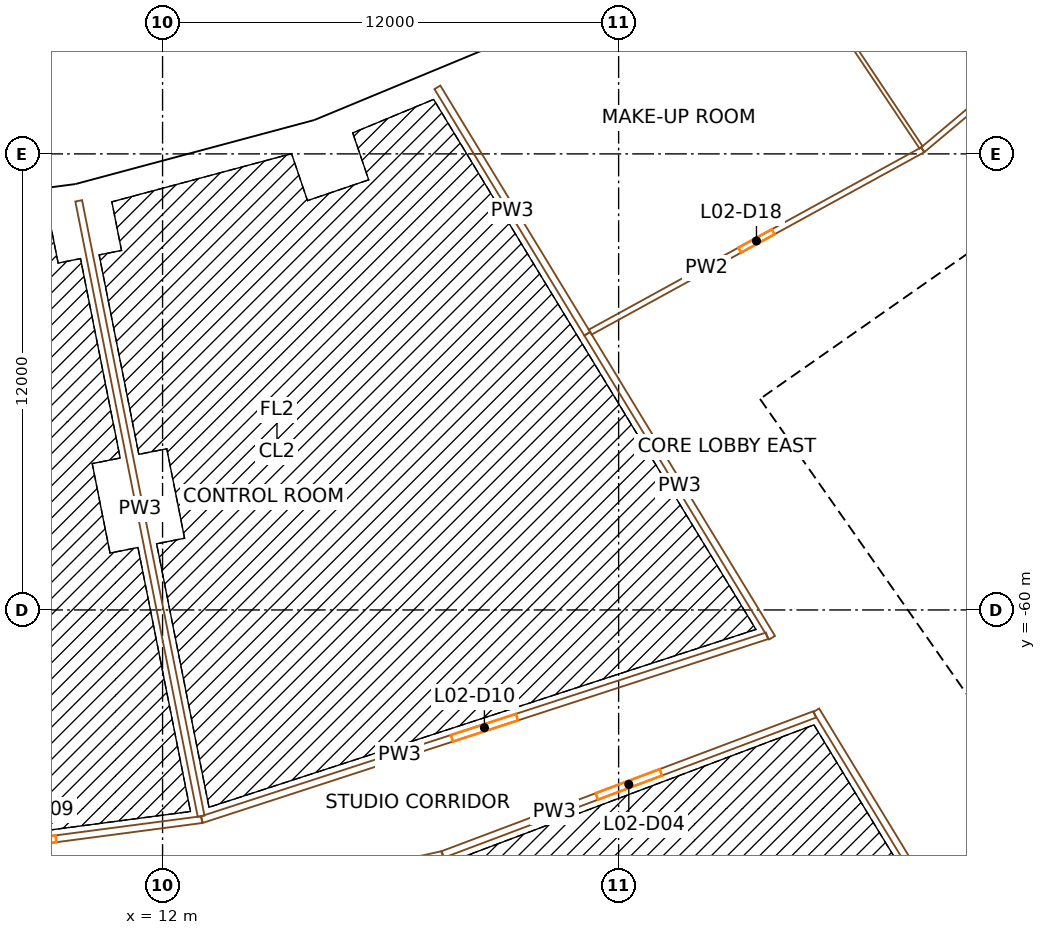
"""IFC4 building model, lengths in metres.
Left out: names, types, materials, properties, quantities, classifications, styles, units other than length and angle.
Written with IfcOpenShell. Run it as: python <this file> out.ifc"""

import sys

from ifc_helpers import new_model, si_unit, direction, frame, frame_2d, origin, origin_2d, place, context, subcontext, project, spatial, rectangle, extrude, element, fill, save


model = new_model("IFC4")
c1 = context("Model", 3, precision=1e-05, world=origin(), true_north=direction((0.0, 1.0)))
c2 = subcontext(c1, "Body", "Model", "MODEL_VIEW")
j1 = project(units=[si_unit("LENGTHUNIT", "METRE"), si_unit("PLANEANGLEUNIT", "RADIAN")], contexts=[c1])
p1 = place(None, origin())
s1 = spatial("IfcSite", under=j1, at=p1, CompositionType="ELEMENT")
p2 = place(p1, origin())
s2 = spatial("IfcBuilding", under=s1, at=p2, CompositionType="ELEMENT")
p3 = place(p2, frame((0.0, 0.0, 18.0)))
s3 = spatial("IfcBuildingStorey", under=s2, at=p3, CompositionType="ELEMENT", Elevation=18.0)
p4 = place(p3, frame((9.901, -49.775, 0.0), z_axis=(0.0, 0.0, 1.0), x_axis=(0.980785280403, 0.195090322016, 0.0)))
e1 = element("IfcColumn", 1, at=p4, inside=s3, PredefinedType="COLUMN", context=c2, shape_type="SweptSolid", body=[
    extrude(rectangle(XDim=1.1, YDim=1.3, at=origin_2d()), origin(), (0.0, 0.0, 1.0), 9.0),
])
p5 = place(p3, frame((11.364, -57.131, 0.0), z_axis=(0.0, 0.0, 1.0), x_axis=(0.980785280403, 0.195090322016, 0.0)))
e2 = element("IfcColumn", 2, at=p5, inside=s3, PredefinedType="COLUMN", context=c2, shape_type="SweptSolid", body=[
    extrude(rectangle(XDim=1.4, YDim=1.8, at=origin_2d()), origin(), (0.0, 0.0, 1.0), 9.0),
])
p6 = place(p3, frame((16.313, -48.057, 0.0), z_axis=(0.0, 0.0, 1.0), x_axis=(0.946930129495, 0.321439465303, 0.0)))
e3 = element("IfcColumn", 3, at=p6, inside=s3, PredefinedType="COLUMN", context=c2, shape_type="SweptSolid", body=[
    extrude(rectangle(XDim=1.1, YDim=1.3, at=origin_2d()), origin(), (0.0, 0.0, 1.0), 9.0),
])
p7 = place(p3, frame((18.724, -55.159, 0.0), z_axis=(0.0, 0.0, 1.0), x_axis=(0.946930129495, 0.321439465303, 0.0)))
e4 = element("IfcColumn", 4, at=p7, inside=s3, PredefinedType="COLUMN", context=c2, shape_type="SweptSolid", body=[
    extrude(rectangle(XDim=1.4, YDim=1.8, at=origin_2d()), origin(), (0.0, 0.0, 1.0), 9.0),
])
p8 = place(p3, frame((22.446, -45.516, 0.0), z_axis=(0.0, 0.0, 1.0), x_axis=(0.896872741533, 0.442288690219, 0.0)))
e5 = element("IfcColumn", 5, at=p8, inside=s3, PredefinedType="COLUMN", context=c2, shape_type="SweptSolid", body=[
    extrude(rectangle(XDim=1.1, YDim=1.3, at=origin_2d()), origin(), (0.0, 0.0, 1.0), 9.0),
])
for number, where, z_axis, x_axis in (
    (6, (25.763, -52.243, 0.0), (0.0, 0.0, 1.0), (0.897, 0.442, 0.0)),
    (7, (32.362, -48.433, 0.0), (0.0, 0.0, 1.0), (0.831, 0.556, 0.0)),
):
    element("IfcColumn", number, at=place(p3, frame(where, z_axis=z_axis, x_axis=x_axis)), inside=s3, PredefinedType="COLUMN", context=c2, shape_type="SweptSolid", body=[
        extrude(rectangle(XDim=1.4, YDim=1.8, at=origin_2d()), origin(), (0.0, 0.0, 1.0), 9.0),
    ])
p9 = place(p3, frame((36.717, -66.337, 0.0), z_axis=(0.0, 0.0, 1.0), x_axis=(-0.573577477574, 0.819151315216, 0.0)))
e8 = element("IfcWall", 8, at=p9, inside=s3, PredefinedType="SHEAR", context=c2, shape_type="SweptSolid", body=[
    extrude(rectangle(XDim=14.8, YDim=0.9, at=frame_2d((7.4, 0.0))), origin(), (0.0, 0.0, 1.0), 8.6),
])
p10 = place(p9, frame((6.2, 0.0, 0.0)))
e9 = element("IfcOpeningElement", 9, at=p10, cuts=e8, PredefinedType="OPENING", context=c2, shape_type="SweptSolid", body=[
    extrude(rectangle(XDim=2.4, YDim=2.1, at=frame_2d((1.2, 1.05))), frame((0.0, 0.46, 0.0), z_axis=(0.0, -1.0, 0.0), x_axis=(1.0, 0.0, 0.0)), (0.0, 0.0, 1.0), 0.92),
])
p11 = place(p3, frame((28.854, -54.324, 0.0), z_axis=(0.0, 0.0, 1.0), x_axis=(0.819145767589, 0.573585400304, 0.0)))
e10 = element("IfcWall", 10, at=p11, inside=s3, PredefinedType="SHEAR", context=c2, shape_type="SweptSolid", body=[
    extrude(rectangle(XDim=15.045, YDim=0.9, at=frame_2d((7.523, 0.0))), origin(), (0.0, 0.0, 1.0), 8.6),
])
p12 = place(p11, frame((0.6, 0.0, 0.0)))
e11 = element("IfcOpeningElement", 11, at=p12, cuts=e10, PredefinedType="OPENING", context=c2, shape_type="SweptSolid", body=[
    extrude(rectangle(XDim=1.0, YDim=2.1, at=frame_2d((0.5, 1.05))), frame((0.0, 0.46, 0.0), z_axis=(0.0, -1.0, 0.0), x_axis=(1.0, 0.0, 0.0)), (0.0, 0.0, 1.0), 0.92),
])
p13 = place(p11, frame((3.275, 0.0, 0.0)))
e12 = element("IfcOpeningElement", 12, at=p13, cuts=e10, PredefinedType="OPENING", context=c2, shape_type="SweptSolid", body=[
    extrude(rectangle(XDim=1.0, YDim=2.1, at=frame_2d((0.5, 1.05))), frame((0.0, 0.46, 0.0), z_axis=(0.0, -1.0, 0.0), x_axis=(1.0, 0.0, 0.0)), (0.0, 0.0, 1.0), 0.92),
])
p14 = place(p11, frame((6.225, 0.0, 0.0)))
e13 = element("IfcOpeningElement", 13, at=p14, cuts=e10, PredefinedType="OPENING", context=c2, shape_type="SweptSolid", body=[
    extrude(rectangle(XDim=0.9, YDim=2.1, at=frame_2d((0.45, 1.05))), frame((0.0, 0.46, 0.0), z_axis=(0.0, -1.0, 0.0), x_axis=(1.0, 0.0, 0.0)), (0.0, 0.0, 1.0), 0.92),
])
p15 = place(p11, frame((13.495, 0.0, 0.0)))
e14 = element("IfcOpeningElement", 14, at=p15, cuts=e10, PredefinedType="OPENING", context=c2, shape_type="SweptSolid", body=[
    extrude(rectangle(XDim=1.1, YDim=2.1, at=frame_2d((0.55, 1.05))), frame((0.0, 0.46, 0.0), z_axis=(0.0, -1.0, 0.0), x_axis=(1.0, 0.0, 0.0)), (0.0, 0.0, 1.0), 0.92),
])
p16 = place(p3, frame((31.895, -58.666, 0.0), z_axis=(0.0, 0.0, 1.0), x_axis=(0.819166993208, 0.573555086491, 0.0)))
e15 = element("IfcWall", 15, at=p16, inside=s3, PredefinedType="SOLIDWALL", context=c2, shape_type="SweptSolid", body=[
    extrude(rectangle(XDim=7.95, YDim=0.3, at=frame_2d((3.975, 0.0))), origin(), (0.0, 0.0, 1.0), 8.6),
])
p17 = place(p16, frame((0.675, 0.0, 0.0)))
e16 = element("IfcOpeningElement", 16, at=p17, cuts=e15, PredefinedType="OPENING", context=c2, shape_type="SweptSolid", body=[
    extrude(rectangle(XDim=1.1, YDim=2.1, at=frame_2d((0.55, 1.05))), frame((0.0, 0.16, 0.0), z_axis=(0.0, -1.0, 0.0), x_axis=(1.0, 0.0, 0.0)), (0.0, 0.0, 1.0), 0.32),
])
p18 = place(p16, frame((3.425, 0.0, 0.0)))
e17 = element("IfcOpeningElement", 17, at=p18, cuts=e15, PredefinedType="OPENING", context=c2, shape_type="SweptSolid", body=[
    extrude(rectangle(XDim=1.1, YDim=2.1, at=frame_2d((0.55, 1.05))), frame((0.0, 0.16, 0.0), z_axis=(0.0, -1.0, 0.0), x_axis=(1.0, 0.0, 0.0)), (0.0, 0.0, 1.0), 0.32),
])
p19 = place(p16, frame((6.175, 0.0, 0.0)))
e18 = element("IfcOpeningElement", 18, at=p19, cuts=e15, PredefinedType="OPENING", context=c2, shape_type="SweptSolid", body=[
    extrude(rectangle(XDim=1.1, YDim=2.1, at=frame_2d((0.55, 1.05))), frame((0.0, 0.16, 0.0), z_axis=(0.0, -1.0, 0.0), x_axis=(1.0, 0.0, 0.0)), (0.0, 0.0, 1.0), 0.32),
])
p20 = place(p3, frame((30.461, -56.618, 0.0), z_axis=(0.0, 0.0, 1.0), x_axis=(0.819142461705, 0.573590121456, 0.0)))
e19 = element("IfcWall", 19, at=p20, inside=s3, PredefinedType="SOLIDWALL", context=c2, shape_type="SweptSolid", body=[
    extrude(rectangle(XDim=7.95, YDim=0.3, at=frame_2d((3.975, 0.0))), origin(), (0.0, 0.0, 1.0), 8.6),
])
p21 = place(p3, frame((33.938, -57.052, 0.0), z_axis=(0.0, 0.0, 1.0), x_axis=(-0.573581496053, 0.819148501424, 0.0)))
e20 = element("IfcWall", 20, at=p21, inside=s3, PredefinedType="SOLIDWALL", context=c2, shape_type="SweptSolid", body=[
    extrude(rectangle(XDim=2.2, YDim=0.3, at=frame_2d((1.1, 0.0))), origin(), (0.0, 0.0, 1.0), 8.6),
])
p22 = place(p3, frame((32.218, -55.204, 0.0), z_axis=(0.0, 0.0, 1.0), x_axis=(-0.573581496053, 0.819148501424, 0.0)))
e21 = element("IfcWall", 21, at=p22, inside=s3, PredefinedType="PARTITIONING", context=c2, shape_type="SweptSolid", body=[
    extrude(rectangle(XDim=2.2, YDim=0.15, at=frame_2d((1.1, 0.0))), origin(), (0.0, 0.0, 1.0), 8.6),
])
p23 = place(p3, frame((9.78, -49.011, 0.0), z_axis=(0.0, 0.0, 1.0), x_axis=(-0.991445350147, -0.130522479563, 0.0)))
e22 = element("IfcWall", 22, at=p23, inside=s3, PredefinedType="SOLIDWALL", context=c2, shape_type="SweptSolid", body=[
    extrude(rectangle(XDim=6.597, YDim=0.45, at=frame_2d((3.299, 0.0))), origin(), (0.0, 0.0, 1.0), 7.7),
])
p24 = place(p3, frame((16.007, -47.339, 0.0), z_axis=(0.0, 0.0, 1.0), x_axis=(-0.965926830738, -0.25881529642, 0.0)))
e23 = element("IfcWall", 23, at=p24, inside=s3, PredefinedType="SOLIDWALL", context=c2, shape_type="SweptSolid", body=[
    extrude(rectangle(XDim=6.419, YDim=0.45, at=frame_2d((3.209, 0.0))), origin(), (0.0, 0.0, 1.0), 7.7),
])
p25 = place(p3, frame((22.131, -44.81, 0.0), z_axis=(0.0, 0.0, 1.0), x_axis=(-0.923877459804, -0.382688436284, 0.0)))
e24 = element("IfcWall", 24, at=p25, inside=s3, PredefinedType="SOLIDWALL", context=c2, shape_type="SweptSolid", body=[
    extrude(rectangle(XDim=6.597, YDim=0.45, at=frame_2d((3.299, 0.0))), origin(), (0.0, 0.0, 1.0), 7.7),
])
p26 = place(p3, frame((4.369, -66.657, 0.0), z_axis=(0.0, 0.0, 1.0), x_axis=(0.991443260322, 0.130538352841, 0.0)))
e25 = element("IfcWall", 25, at=p26, inside=s3, PredefinedType="PARTITIONING", context=c2, shape_type="SweptSolid", body=[
    extrude(rectangle(XDim=8.738, YDim=0.18, at=frame_2d((4.369, 0.0))), origin(), (0.0, 0.0, 1.0), 7.6),
])
p27 = place(p26, frame((3.869, 0.0, 0.0)))
e26 = element("IfcOpeningElement", 26, at=p27, cuts=e25, PredefinedType="OPENING", context=c2, shape_type="SweptSolid", body=[
    extrude(rectangle(XDim=1.0, YDim=2.1, at=frame_2d((0.5, 1.05))), frame((0.0, 0.1, 0.0), z_axis=(0.0, -1.0, 0.0), x_axis=(1.0, 0.0, 0.0)), (0.0, 0.0, 1.0), 0.2),
])
p28 = place(p3, frame((9.793, -49.235, 0.0), z_axis=(0.0, 0.0, 1.0), x_axis=(0.195089444663, -0.980785454919, 0.0)))
e27 = element("IfcWall", 27, at=p28, inside=s3, PredefinedType="PARTITIONING", context=c2, shape_type="SweptSolid", body=[
    extrude(rectangle(XDim=16.51, YDim=0.18, at=frame_2d((8.255, 0.0))), origin(), (0.0, 0.0, 1.0), 7.6),
])
p29 = place(p3, frame((10.529, -68.394, 0.0), z_axis=(0.0, 0.0, 1.0), x_axis=(0.976293034631, 0.216453021533, 0.0)))
e28 = element("IfcWall", 28, at=p29, inside=s3, PredefinedType="PARTITIONING", context=c2, shape_type="SweptSolid", body=[
    extrude(rectangle(XDim=9.042, YDim=0.18, at=frame_2d((4.521, 0.0))), origin(), (0.0, 0.0, 1.0), 7.6),
])
p30 = place(p3, frame((13.032, -65.516, 0.0), z_axis=(0.0, 0.0, 1.0), x_axis=(0.950997351979, 0.309199024141, 0.0)))
e29 = element("IfcWall", 29, at=p30, inside=s3, PredefinedType="PARTITIONING", context=c2, shape_type="SweptSolid", body=[
    extrude(rectangle(XDim=15.639, YDim=0.18, at=frame_2d((7.82, 0.0))), origin(), (0.0, 0.0, 1.0), 7.6),
])
p31 = place(p30, frame((6.92, 0.0, 0.0)))
e30 = element("IfcOpeningElement", 30, at=p31, cuts=e29, PredefinedType="OPENING", context=c2, shape_type="SweptSolid", body=[
    extrude(rectangle(XDim=1.8, YDim=2.1, at=frame_2d((0.9, 1.05))), frame((0.0, 0.1, 0.0), z_axis=(0.0, -1.0, 0.0), x_axis=(1.0, 0.0, 0.0)), (0.0, 0.0, 1.0), 0.2),
])
p32 = place(p3, frame((19.231, -46.249, 0.0), z_axis=(0.0, 0.0, 1.0), x_axis=(0.519582509181, -0.854420280748, 0.0)))
e31 = element("IfcWall", 31, at=p32, inside=s3, PredefinedType="PARTITIONING", context=c2, shape_type="SweptSolid", body=[
    extrude(rectangle(XDim=7.588, YDim=0.18, at=frame_2d((3.794, 0.0))), origin(), (0.0, 0.0, 1.0), 7.6),
])
p33 = place(p3, frame((29.161, -62.748, 0.0), z_axis=(0.0, 0.0, 1.0), x_axis=(-0.935897657387, -0.352272018328, 0.0)))
e32 = element("IfcWall", 32, at=p33, inside=s3, PredefinedType="PARTITIONING", context=c2, shape_type="SweptSolid", body=[
    extrude(rectangle(XDim=10.457, YDim=0.18, at=frame_2d((5.229, 0.0))), origin(), (0.0, 0.0, 1.0), 7.6),
])
p34 = place(p33, frame((4.328, 0.0, 0.0)))
e33 = element("IfcOpeningElement", 33, at=p34, cuts=e32, PredefinedType="OPENING", context=c2, shape_type="SweptSolid", body=[
    extrude(rectangle(XDim=1.8, YDim=2.4, at=frame_2d((0.9, 1.2))), frame((0.0, 0.1, 0.0), z_axis=(0.0, -1.0, 0.0), x_axis=(1.0, 0.0, 0.0)), (0.0, 0.0, 1.0), 0.2),
])
p35 = place(p3, frame((23.174, -52.732, 0.0), z_axis=(0.0, 0.0, 1.0), x_axis=(0.519584464565, -0.854419091654, 0.0)))
e34 = element("IfcWall", 34, at=p35, inside=s3, PredefinedType="PARTITIONING", context=c2, shape_type="SweptSolid", body=[
    extrude(rectangle(XDim=9.36, YDim=0.18, at=frame_2d((4.68, 0.0))), origin(), (0.0, 0.0, 1.0), 7.6),
])
p36 = place(p3, frame((23.253, -52.689, 0.0), z_axis=(0.0, 0.0, 1.0), x_axis=(0.876830047464, 0.480800444949, 0.0)))
e35 = element("IfcWall", 35, at=p36, inside=s3, PredefinedType="PARTITIONING", context=c2, shape_type="SweptSolid", body=[
    extrude(rectangle(XDim=9.976, YDim=0.15, at=frame_2d((4.988, 0.0))), origin(), (0.0, 0.0, 1.0), 7.6),
])
p37 = place(p36, frame((4.488, 0.0, 0.0)))
e36 = element("IfcOpeningElement", 36, at=p37, cuts=e35, PredefinedType="OPENING", context=c2, shape_type="SweptSolid", body=[
    extrude(rectangle(XDim=1.0, YDim=2.1, at=frame_2d((0.5, 1.05))), frame((0.0, 0.085, 0.0), z_axis=(0.0, -1.0, 0.0), x_axis=(1.0, 0.0, 0.0)), (0.0, 0.0, 1.0), 0.17),
])
p38 = place(p3, frame((27.89, -41.74, 0.0), z_axis=(0.0, 0.0, 1.0), x_axis=(0.555569023768, -0.831470420297, 0.0)))
e37 = element("IfcWall", 37, at=p38, inside=s3, PredefinedType="PARTITIONING", context=c2, shape_type="SweptSolid", body=[
    extrude(rectangle(XDim=7.325, YDim=0.1, at=frame_2d((3.663, 0.0))), origin(), (0.0, 0.0, 1.0), 7.6),
])
p39 = place(p3, frame((29.199, -62.639, 0.0), z_axis=(0.0, 0.0, 1.0), x_axis=(0.519569231187, -0.854428355103, 0.0)))
e38 = element("IfcWall", 38, at=p39, inside=s3, PredefinedType="PARTITIONING", context=c2, shape_type="SweptSolid", body=[
    extrude(rectangle(XDim=9.741, YDim=0.18, at=frame_2d((4.871, 0.0))), origin(), (0.0, 0.0, 1.0), 7.6),
])
p40 = place(p3, frame((32.001, -47.893, 0.0), z_axis=(0.0, 0.0, 1.0), x_axis=(0.765734049768, 0.643157340801, 0.0)))
e39 = element("IfcWall", 39, at=p40, inside=s3, PredefinedType="PARTITIONING", context=c2, shape_type="SweptSolid", body=[
    extrude(rectangle(XDim=12.524, YDim=0.15, at=frame_2d((6.262, 0.0))), origin(), (0.0, 0.0, 1.0), 7.6),
])
p41 = place(p40, frame((5.762, 0.0, 0.0)))
e40 = element("IfcOpeningElement", 40, at=p41, cuts=e39, PredefinedType="OPENING", context=c2, shape_type="SweptSolid", body=[
    extrude(rectangle(XDim=1.0, YDim=2.1, at=frame_2d((0.5, 1.05))), frame((0.0, 0.085, 0.0), z_axis=(0.0, -1.0, 0.0), x_axis=(1.0, 0.0, 0.0)), (0.0, 0.0, 1.0), 0.17),
])
p42 = place(p10, origin())
e41 = element("IfcDoor", 41, at=p42, inside=s3, OperationType="DOUBLE_DOOR_SINGLE_SWING", PredefinedType="DOOR", context=c2, shape_type="SweptSolid", body=[
    extrude(rectangle(XDim=2.4, YDim=2.1, at=frame_2d((1.2, 1.05))), frame((0.0, 0.025, 0.0), z_axis=(0.0, -1.0, 0.0), x_axis=(1.0, 0.0, 0.0)), (0.0, 0.0, 1.0), 0.05),
])
fill(e9, e41)
p43 = place(p17, origin())
e42 = element("IfcDoor", 42, at=p43, inside=s3, OperationType="DOUBLE_DOOR_SLIDING", PredefinedType="DOOR", context=c2, shape_type="SweptSolid", body=[
    extrude(rectangle(XDim=1.1, YDim=2.1, at=frame_2d((0.55, 1.05))), frame((0.0, 0.025, 0.0), z_axis=(0.0, -1.0, 0.0), x_axis=(1.0, 0.0, 0.0)), (0.0, 0.0, 1.0), 0.05),
])
fill(e16, e42)
p44 = place(p12, origin())
e43 = element("IfcDoor", 43, at=p44, inside=s3, OperationType="SINGLE_SWING_LEFT", PredefinedType="DOOR", context=c2, shape_type="SweptSolid", body=[
    extrude(rectangle(XDim=1.0, YDim=2.1, at=frame_2d((0.5, 1.05))), frame((0.0, 0.025, 0.0), z_axis=(0.0, -1.0, 0.0), x_axis=(1.0, 0.0, 0.0)), (0.0, 0.0, 1.0), 0.05),
])
fill(e11, e43)
p45 = place(p13, origin())
e44 = element("IfcDoor", 44, at=p45, inside=s3, OperationType="SINGLE_SWING_RIGHT", PredefinedType="DOOR", context=c2, shape_type="SweptSolid", body=[
    extrude(rectangle(XDim=1.0, YDim=2.1, at=frame_2d((0.5, 1.05))), frame((0.0, 0.025, 0.0), z_axis=(0.0, -1.0, 0.0), x_axis=(1.0, 0.0, 0.0)), (0.0, 0.0, 1.0), 0.05),
])
fill(e12, e44)
p46 = place(p34, origin())
e45 = element("IfcDoor", 45, at=p46, inside=s3, OperationType="DOUBLE_DOOR_SINGLE_SWING", PredefinedType="DOOR", context=c2, shape_type="SweptSolid", body=[
    extrude(rectangle(XDim=1.8, YDim=2.4, at=frame_2d((0.9, 1.2))), frame((0.0, 0.025, 0.0), z_axis=(0.0, -1.0, 0.0), x_axis=(1.0, 0.0, 0.0)), (0.0, 0.0, 1.0), 0.05),
])
fill(e33, e45)
p47 = place(p27, origin())
e46 = element("IfcDoor", 46, at=p47, inside=s3, OperationType="SINGLE_SWING_RIGHT", PredefinedType="DOOR", context=c2, shape_type="SweptSolid", body=[
    extrude(rectangle(XDim=1.0, YDim=2.1, at=frame_2d((0.5, 1.05))), frame((0.0, 0.025, 0.0), z_axis=(0.0, -1.0, 0.0), x_axis=(1.0, 0.0, 0.0)), (0.0, 0.0, 1.0), 0.05),
])
fill(e26, e46)
p48 = place(p31, origin())
e47 = element("IfcDoor", 47, at=p48, inside=s3, OperationType="DOUBLE_DOOR_SINGLE_SWING", PredefinedType="DOOR", context=c2, shape_type="SweptSolid", body=[
    extrude(rectangle(XDim=1.8, YDim=2.1, at=frame_2d((0.9, 1.05))), frame((0.0, 0.025, 0.0), z_axis=(0.0, -1.0, 0.0), x_axis=(1.0, 0.0, 0.0)), (0.0, 0.0, 1.0), 0.05),
])
fill(e30, e47)
p49 = place(p37, origin())
e48 = element("IfcDoor", 48, at=p49, inside=s3, OperationType="SINGLE_SWING_RIGHT", PredefinedType="DOOR", context=c2, shape_type="SweptSolid", body=[
    extrude(rectangle(XDim=1.0, YDim=2.1, at=frame_2d((0.5, 1.05))), frame((0.0, 0.025, 0.0), z_axis=(0.0, -1.0, 0.0), x_axis=(1.0, 0.0, 0.0)), (0.0, 0.0, 1.0), 0.05),
])
fill(e36, e48)
save(model, sys.argv[1])
